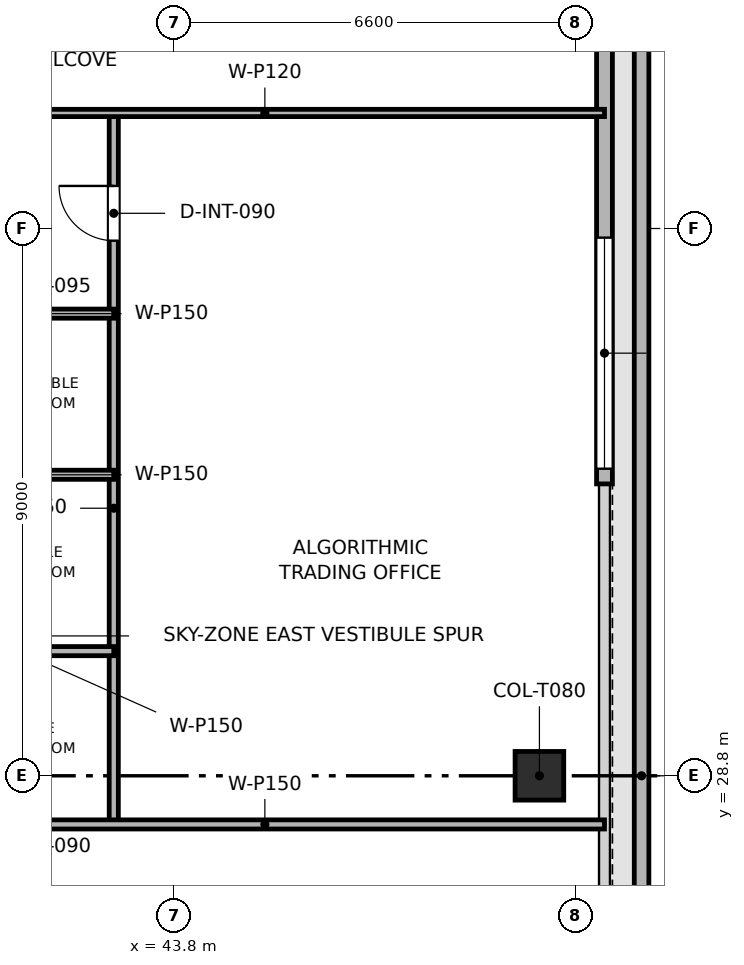
"""IFC4 building model, lengths in metres.
Left out: names, types, materials, properties, quantities, classifications, styles, units other than length and angle.
Written with IfcOpenShell. Run it as: python <this file> out.ifc"""

import sys

from ifc_helpers import new_model, si_unit, direction, frame, frame_2d, origin, origin_2d, place, context, subcontext, project, spatial, rectangle, extrude, element, fill, save


model = new_model("IFC4")
c1 = context("Model", 3, precision=1e-05, world=origin(), true_north=direction((0.0, 1.0)))
c2 = subcontext(c1, "Body", "Model", "MODEL_VIEW")
j1 = project(units=[si_unit("LENGTHUNIT", "METRE"), si_unit("PLANEANGLEUNIT", "RADIAN")], contexts=[c1])
p1 = place(None, origin())
s1 = spatial("IfcSite", under=j1, at=p1, CompositionType="ELEMENT")
p2 = place(p1, origin())
s2 = spatial("IfcBuilding", under=s1, at=p2, CompositionType="ELEMENT")
p3 = place(p2, frame((0.0, 0.0, 333.0)))
s3 = spatial("IfcBuildingStorey", under=s2, at=p3, CompositionType="ELEMENT", Elevation=333.0)
p4 = place(p3, frame((49.8, 28.8, 0.003), z_axis=(0.0, 0.0, 1.0), x_axis=(1.0, 0.0, 0.0)))
e1 = element("IfcColumn", 1, at=p4, inside=s3, PredefinedType="COLUMN", context=c2, shape_type="SweptSolid", body=[
    extrude(rectangle(XDim=0.8, YDim=0.8, at=origin_2d()), origin(), (0.0, 0.0, 1.0), 3.504),
])
p5 = place(p3, frame((51.48, 12.555, 0.0), z_axis=(0.0, 0.0, 1.0), x_axis=(0.0, 1.0, 0.0)))
e2 = element("IfcWall", 2, at=p5, inside=s3, PredefinedType="PARAPET", context=c2, shape_type="SweptSolid", body=[
    extrude(rectangle(XDim=32.49, YDim=0.24, at=frame_2d((16.245, 0.0))), origin(), (0.0, 0.0, 1.0), 1.2),
])
p6 = place(p3, frame((50.87, 45.0, 0.0), z_axis=(0.0, 0.0, 1.0), x_axis=(0.0, -1.0, 0.0)))
e3 = element("IfcWall", 3, at=p6, inside=s3, PredefinedType="SOLIDWALL", context=c2, shape_type="SweptSolid", body=[
    extrude(rectangle(XDim=11.4, YDim=0.26, at=frame_2d((5.7, 0.0))), origin(), (0.0, 0.0, 1.0), 3.51),
])
p7 = place(p6, frame((7.35, 0.0, 0.9)))
e4 = element("IfcOpeningElement", 4, at=p7, cuts=e3, PredefinedType="OPENING", context=c2, shape_type="SweptSolid", body=[
    extrude(rectangle(XDim=3.8, YDim=1.9, at=frame_2d((1.9, 0.95))), frame((0.0, 0.14, 0.0), z_axis=(0.0, -1.0, 0.0), x_axis=(1.0, 0.0, 0.0)), (0.0, 0.0, 1.0), 0.28),
])
p8 = place(p3, frame((42.8, 28.0, 0.0), z_axis=(0.0, 0.0, 1.0), x_axis=(0.0, 1.0, 0.0)))
e5 = element("IfcWall", 5, at=p8, inside=s3, PredefinedType="PARTITIONING", context=c2, shape_type="SweptSolid", body=[
    extrude(rectangle(XDim=11.7, YDim=0.15, at=frame_2d((5.85, 0.0))), origin(), (0.0, 0.0, 1.0), 3.095),
])
p9 = place(p8, frame((9.6, 0.0, 0.0)))
e6 = element("IfcOpeningElement", 6, at=p9, cuts=e5, PredefinedType="OPENING", context=c2, shape_type="SweptSolid", body=[
    extrude(rectangle(XDim=0.9, YDim=2.1, at=frame_2d((0.45, 1.05))), frame((0.0, 0.085, 0.0), z_axis=(0.0, -1.0, 0.0), x_axis=(1.0, 0.0, 0.0)), (0.0, 0.0, 1.0), 0.17),
])
p10 = place(p3, frame((39.7, 28.0, 0.0), z_axis=(0.0, 0.0, 1.0), x_axis=(1.0, 0.0, 0.0)))
e7 = element("IfcWall", 7, at=p10, inside=s3, PredefinedType="PARTITIONING", context=c2, shape_type="SweptSolid", body=[
    extrude(rectangle(XDim=11.17, YDim=0.15, at=frame_2d((5.585, 0.0))), origin(), (0.0, 0.0, 1.0), 3.135),
])
for number, where, z_axis, x_axis in (
    (8, (39.7, 36.4, 0.0), (0.0, 0.0, 1.0), (1.0, 0.0, 0.0)),
    (9, (39.7, 30.85, 0.0), (0.0, 0.0, 1.0), (1.0, 0.0, 0.0)),
    (10, (39.7, 33.75, 0.0), (0.0, 0.0, 1.0), (1.0, 0.0, 0.0)),
):
    element("IfcWall", number, at=place(p3, frame(where, z_axis=z_axis, x_axis=x_axis)), inside=s3, PredefinedType="PARTITIONING", context=c2, shape_type="SweptSolid", body=[
        extrude(rectangle(XDim=3.1, YDim=0.15, at=frame_2d((1.55, 0.0))), origin(), (0.0, 0.0, 1.0), 3.135),
    ])
p11 = place(p3, frame((39.7, 39.7, 0.0), z_axis=(0.0, 0.0, 1.0), x_axis=(1.0, 0.0, 0.0)))
e11 = element("IfcWall", 11, at=p11, inside=s3, PredefinedType="PARTITIONING", context=c2, shape_type="SweptSolid", body=[
    extrude(rectangle(XDim=11.17, YDim=0.12, at=frame_2d((5.585, 0.0))), origin(), (0.0, 0.0, 1.0), 3.095),
])
p12 = place(p7, origin())
e12 = element("IfcWindow", 12, at=p12, inside=s3, PartitioningType="SINGLE_PANEL", PredefinedType="WINDOW", context=c2, shape_type="SweptSolid", body=[
    extrude(rectangle(XDim=3.8, YDim=1.9, at=frame_2d((1.9, 0.95))), frame((0.0, 0.03, 0.0), z_axis=(0.0, -1.0, 0.0), x_axis=(1.0, 0.0, 0.0)), (0.0, 0.0, 1.0), 0.06),
])
fill(e4, e12)
p13 = place(p9, origin())
e13 = element("IfcDoor", 13, at=p13, inside=s3, OperationType="SINGLE_SWING_RIGHT", PredefinedType="DOOR", context=c2, shape_type="SweptSolid", body=[
    extrude(rectangle(XDim=0.9, YDim=2.1, at=frame_2d((0.45, 1.05))), frame((0.0, 0.025, 0.0), z_axis=(0.0, -1.0, 0.0), x_axis=(1.0, 0.0, 0.0)), (0.0, 0.0, 1.0), 0.05),
])
fill(e6, e13)
save(model, sys.argv[1])
